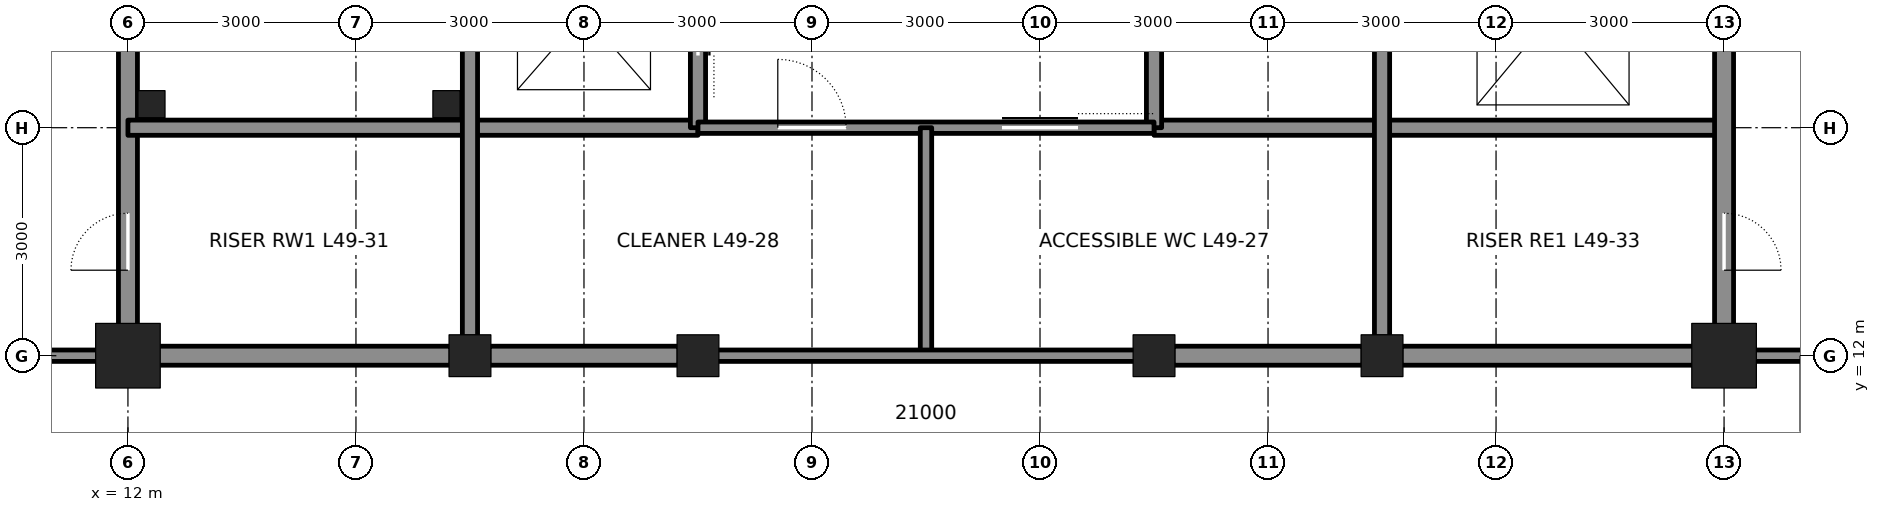
"""IFC4 building model, lengths in metres.
Left out: names, types, materials, properties, quantities, classifications, styles, units other than length and angle.
Written with IfcOpenShell. Run it as: python <this file> out.ifc"""

import sys

from ifc_helpers import new_model, si_unit, direction, frame, frame_2d, origin, origin_2d, place, context, subcontext, project, spatial, rectangle, hollow_rectangle, extrude, element, fill, save


model = new_model("IFC4")
c1 = context("Model", 3, precision=1e-05, world=origin(), true_north=direction((0.0, 1.0)))
c2 = subcontext(c1, "Body", "Model", "MODEL_VIEW")
j1 = project(units=[si_unit("LENGTHUNIT", "METRE"), si_unit("PLANEANGLEUNIT", "RADIAN")], contexts=[c1])
p1 = place(None, origin())
s1 = spatial("IfcSite", under=j1, at=p1, CompositionType="ELEMENT")
p2 = place(p1, origin())
s2 = spatial("IfcBuilding", under=s1, at=p2, CompositionType="ELEMENT")
p3 = place(p2, frame((0.0, 0.0, 222.3)))
s3 = spatial("IfcBuildingStorey", under=s2, at=p3, CompositionType="ELEMENT", Elevation=222.3)
p4 = place(p3, frame((12.0, 12.0, 0.0), z_axis=(0.0, 0.0, 1.0), x_axis=(1.0, 0.0, 0.0)))
e1 = element("IfcColumn", 1, at=p4, inside=s3, PredefinedType="COLUMN", context=c2, shape_type="SweptSolid", body=[
    extrude(hollow_rectangle(XDim=0.85, YDim=0.85, WallThickness=0.085, at=origin_2d()), origin(), (0.0, 0.0, 1.0), 4.2),
])
for number, where, z_axis, x_axis in (
    (2, (16.5, 12.0, 0.0), (0.0, 0.0, 1.0), (1.0, 0.0, 0.0)),
    (3, (19.5, 12.0, 0.0), (0.0, 0.0, 1.0), (1.0, 0.0, 0.0)),
    (4, (25.5, 12.0, 0.0), (0.0, 0.0, 1.0), (1.0, 0.0, 0.0)),
    (5, (28.5, 12.0, 0.0), (0.0, 0.0, 1.0), (1.0, 0.0, 0.0)),
):
    element("IfcColumn", number, at=place(p3, frame(where, z_axis=z_axis, x_axis=x_axis)), inside=s3, PredefinedType="COLUMN", context=c2, shape_type="SweptSolid", body=[
        extrude(hollow_rectangle(XDim=0.55, YDim=0.55, WallThickness=0.045, at=origin_2d()), origin(), (0.0, 0.0, 1.0), 4.2),
    ])
p5 = place(p3, frame((33.0, 12.0, 0.0), z_axis=(0.0, 0.0, 1.0), x_axis=(1.0, 0.0, 0.0)))
e6 = element("IfcColumn", 6, at=p5, inside=s3, PredefinedType="COLUMN", context=c2, shape_type="SweptSolid", body=[
    extrude(hollow_rectangle(XDim=0.85, YDim=0.85, WallThickness=0.085, at=origin_2d()), origin(), (0.0, 0.0, 1.0), 4.2),
])
p6 = place(p3, frame((12.0, 12.25, 0.0), z_axis=(0.0, 0.0, 1.0), x_axis=(0.0, 1.0, 0.0)))
e7 = element("IfcWall", 7, at=p6, inside=s3, PredefinedType="SOLIDWALL", context=c2, shape_type="SweptSolid", body=[
    extrude(rectangle(XDim=8.5, YDim=0.25, at=frame_2d((4.25, 0.0))), origin(), (0.0, 0.0, 1.0), 3.113),
])
p7 = place(p6, frame((0.875, 0.0, 0.0)))
e8 = element("IfcOpeningElement", 8, at=p7, cuts=e7, PredefinedType="OPENING", context=c2, shape_type="SweptSolid", body=[
    extrude(rectangle(XDim=0.75, YDim=2.1, at=frame_2d((0.375, 1.05))), frame((0.0, 0.135, 0.0), z_axis=(0.0, -1.0, 0.0), x_axis=(1.0, 0.0, 0.0)), (0.0, 0.0, 1.0), 0.27),
])
p8 = place(p3, frame((12.25, 12.0, 0.0), z_axis=(0.0, 0.0, 1.0), x_axis=(1.0, 0.0, 0.0)))
e9 = element("IfcWall", 9, at=p8, inside=s3, PredefinedType="SOLIDWALL", context=c2, shape_type="SweptSolid", body=[
    extrude(rectangle(XDim=4.0, YDim=0.25, at=frame_2d((2.0, 0.0))), origin(), (0.0, 0.0, 1.0), 3.181),
])
for number, where, z_axis, x_axis in (
    (10, (16.75, 12.0, 0.0), (0.0, 0.0, 1.0), (1.0, 0.0, 0.0)),
    (11, (25.75, 12.0, 0.0), (0.0, 0.0, 1.0), (1.0, 0.0, 0.0)),
):
    element("IfcWall", number, at=place(p3, frame(where, z_axis=z_axis, x_axis=x_axis)), inside=s3, PredefinedType="SOLIDWALL", context=c2, shape_type="SweptSolid", body=[
        extrude(rectangle(XDim=2.5, YDim=0.25, at=frame_2d((1.25, 0.0))), origin(), (0.0, 0.0, 1.0), 3.181),
    ])
p9 = place(p3, frame((28.75, 12.0, 0.0), z_axis=(0.0, 0.0, 1.0), x_axis=(1.0, 0.0, 0.0)))
e12 = element("IfcWall", 12, at=p9, inside=s3, PredefinedType="SOLIDWALL", context=c2, shape_type="SweptSolid", body=[
    extrude(rectangle(XDim=4.0, YDim=0.25, at=frame_2d((2.0, 0.0))), origin(), (0.0, 0.0, 1.0), 3.181),
])
for number, where, z_axis, x_axis in (
    (13, (12.0, 15.0, 0.0), (0.0, 0.0, 1.0), (1.0, 0.0, 0.0)),
    (14, (25.5, 15.0, 0.0), (0.0, 0.0, 1.0), (1.0, 0.0, 0.0)),
):
    element("IfcWall", number, at=place(p3, frame(where, z_axis=z_axis, x_axis=x_axis)), inside=s3, PredefinedType="SOLIDWALL", context=c2, shape_type="SweptSolid", body=[
        extrude(rectangle(XDim=7.5, YDim=0.2, at=frame_2d((3.75, 0.0))), origin(), (0.0, 0.0, 1.0), 4.04),
    ])
p10 = place(p3, frame((16.5, 12.25, 0.0), z_axis=(0.0, 0.0, 1.0), x_axis=(0.0, 1.0, 0.0)))
e15 = element("IfcWall", 15, at=p10, inside=s3, PredefinedType="SOLIDWALL", context=c2, shape_type="SweptSolid", body=[
    extrude(rectangle(XDim=8.5, YDim=0.2, at=frame_2d((4.25, 0.0))), origin(), (0.0, 0.0, 1.0), 3.113),
])
p11 = place(p3, frame((19.5, 15.0, 0.0), z_axis=(0.0, 0.0, 1.0), x_axis=(0.0, 1.0, 0.0)))
e16 = element("IfcWall", 16, at=p11, inside=s3, PredefinedType="SOLIDWALL", context=c2, shape_type="SweptSolid", body=[
    extrude(rectangle(XDim=12.0, YDim=0.2, at=frame_2d((6.0, 0.0))), origin(), (0.0, 0.0, 1.0), 3.064),
])
p12 = place(p11, frame((0.95, 0.0, 0.0)))
e17 = element("IfcOpeningElement", 17, at=p12, cuts=e16, PredefinedType="OPENING", context=c2, shape_type="SweptSolid", body=[
    extrude(rectangle(XDim=1.1, YDim=2.1, at=frame_2d((0.55, 1.05))), frame((0.0, 0.11, 0.0), z_axis=(0.0, -1.0, 0.0), x_axis=(1.0, 0.0, 0.0)), (0.0, 0.0, 1.0), 0.22),
])
p13 = place(p11, frame((3.95, 0.0, 0.0)))
e18 = element("IfcOpeningElement", 18, at=p13, cuts=e16, PredefinedType="OPENING", context=c2, shape_type="SweptSolid", body=[
    extrude(rectangle(XDim=1.1, YDim=2.1, at=frame_2d((0.55, 1.05))), frame((0.0, 0.11, 0.0), z_axis=(0.0, -1.0, 0.0), x_axis=(1.0, 0.0, 0.0)), (0.0, 0.0, 1.0), 0.22),
])
p14 = place(p11, frame((6.95, 0.0, 0.0)))
e19 = element("IfcOpeningElement", 19, at=p14, cuts=e16, PredefinedType="OPENING", context=c2, shape_type="SweptSolid", body=[
    extrude(rectangle(XDim=1.1, YDim=2.1, at=frame_2d((0.55, 1.05))), frame((0.0, 0.11, 0.0), z_axis=(0.0, -1.0, 0.0), x_axis=(1.0, 0.0, 0.0)), (0.0, 0.0, 1.0), 0.22),
])
p15 = place(p11, frame((9.95, 0.0, 0.0)))
e20 = element("IfcOpeningElement", 20, at=p15, cuts=e16, PredefinedType="OPENING", context=c2, shape_type="SweptSolid", body=[
    extrude(rectangle(XDim=1.1, YDim=2.1, at=frame_2d((0.55, 1.05))), frame((0.0, 0.11, 0.0), z_axis=(0.0, -1.0, 0.0), x_axis=(1.0, 0.0, 0.0)), (0.0, 0.0, 1.0), 0.22),
])
p16 = place(p3, frame((25.5, 15.0, 0.0), z_axis=(0.0, 0.0, 1.0), x_axis=(0.0, 1.0, 0.0)))
e21 = element("IfcWall", 21, at=p16, inside=s3, PredefinedType="SOLIDWALL", context=c2, shape_type="SweptSolid", body=[
    extrude(rectangle(XDim=12.0, YDim=0.2, at=frame_2d((6.0, 0.0))), origin(), (0.0, 0.0, 1.0), 3.064),
])
p17 = place(p3, frame((28.5, 12.25, 0.0), z_axis=(0.0, 0.0, 1.0), x_axis=(0.0, 1.0, 0.0)))
e22 = element("IfcWall", 22, at=p17, inside=s3, PredefinedType="SOLIDWALL", context=c2, shape_type="SweptSolid", body=[
    extrude(rectangle(XDim=8.5, YDim=0.2, at=frame_2d((4.25, 0.0))), origin(), (0.0, 0.0, 1.0), 3.113),
])
p18 = place(p3, frame((33.0, 12.25, 0.0), z_axis=(0.0, 0.0, 1.0), x_axis=(0.0, 1.0, 0.0)))
e23 = element("IfcWall", 23, at=p18, inside=s3, PredefinedType="SOLIDWALL", context=c2, shape_type="SweptSolid", body=[
    extrude(rectangle(XDim=8.5, YDim=0.25, at=frame_2d((4.25, 0.0))), origin(), (0.0, 0.0, 1.0), 3.113),
])
p19 = place(p18, frame((6.65, 0.0, 0.0)))
e24 = element("IfcOpeningElement", 24, at=p19, cuts=e23, PredefinedType="OPENING", context=c2, shape_type="SweptSolid", body=[
    extrude(rectangle(XDim=1.2, YDim=2.1, at=frame_2d((0.6, 1.05))), frame((0.0, 0.135, 0.0), z_axis=(0.0, -1.0, 0.0), x_axis=(1.0, 0.0, 0.0)), (0.0, 0.0, 1.0), 0.27),
])
p20 = place(p18, frame((0.875, 0.0, 0.0)))
e25 = element("IfcOpeningElement", 25, at=p20, cuts=e23, PredefinedType="OPENING", context=c2, shape_type="SweptSolid", body=[
    extrude(rectangle(XDim=0.75, YDim=2.1, at=frame_2d((0.375, 1.05))), frame((0.0, 0.135, 0.0), z_axis=(0.0, -1.0, 0.0), x_axis=(1.0, 0.0, 0.0)), (0.0, 0.0, 1.0), 0.27),
])
p21 = place(p3, frame((19.5, 15.0, 0.0), z_axis=(0.0, 0.0, 1.0), x_axis=(1.0, 0.0, 0.0)))
e26 = element("IfcWall", 26, at=p21, inside=s3, PredefinedType="PARTITIONING", context=c2, shape_type="SweptSolid", body=[
    extrude(rectangle(XDim=6.0, YDim=0.15, at=frame_2d((3.0, 0.0))), origin(), (0.0, 0.0, 1.0), 4.04),
])
p22 = place(p21, frame((4.0, 0.0, 0.0)))
e27 = element("IfcOpeningElement", 27, at=p22, cuts=e26, PredefinedType="OPENING", context=c2, shape_type="SweptSolid", body=[
    extrude(rectangle(XDim=1.0, YDim=2.1, at=frame_2d((0.5, 1.05))), frame((0.0, 0.085, 0.0), z_axis=(0.0, -1.0, 0.0), x_axis=(1.0, 0.0, 0.0)), (0.0, 0.0, 1.0), 0.17),
])
p23 = place(p21, frame((1.05, 0.0, 0.0)))
e28 = element("IfcOpeningElement", 28, at=p23, cuts=e26, PredefinedType="OPENING", context=c2, shape_type="SweptSolid", body=[
    extrude(rectangle(XDim=0.9, YDim=2.1, at=frame_2d((0.45, 1.05))), frame((0.0, 0.085, 0.0), z_axis=(0.0, -1.0, 0.0), x_axis=(1.0, 0.0, 0.0)), (0.0, 0.0, 1.0), 0.17),
])
p24 = place(p3, frame((22.5, 15.0, 0.0), z_axis=(0.0, 0.0, 1.0), x_axis=(0.0, -1.0, 0.0)))
e29 = element("IfcWall", 29, at=p24, inside=s3, PredefinedType="PARTITIONING", context=c2, shape_type="SweptSolid", body=[
    extrude(rectangle(XDim=3.0, YDim=0.15, at=frame_2d((1.5, 0.0))), origin(), (0.0, 0.0, 1.0), 4.04),
])
p25 = place(p3, frame((19.5, 12.0, 0.0), z_axis=(0.0, 0.0, 1.0), x_axis=(1.0, 0.0, 0.0)))
e30 = element("IfcWall", 30, at=p25, inside=s3, PredefinedType="PARTITIONING", context=c2, shape_type="SweptSolid", body=[
    extrude(rectangle(XDim=6.0, YDim=0.15, at=frame_2d((3.0, 0.0))), origin(), (0.0, 0.0, 1.0), 3.181),
])
p26 = place(p3, frame((10.2, 12.0, 0.0), z_axis=(0.0, 0.0, 1.0), x_axis=(1.0, 0.0, 0.0)))
e31 = element("IfcWall", 31, at=p26, inside=s3, PredefinedType="PARTITIONING", context=c2, shape_type="SweptSolid", body=[
    extrude(rectangle(XDim=1.8, YDim=0.15, at=frame_2d((0.9, 0.0))), origin(), (0.0, 0.0, 1.0), 3.27),
])
p27 = place(p3, frame((33.0, 12.0, 0.0), z_axis=(0.0, 0.0, 1.0), x_axis=(1.0, 0.0, 0.0)))
e32 = element("IfcWall", 32, at=p27, inside=s3, PredefinedType="PARTITIONING", context=c2, shape_type="SweptSolid", body=[
    extrude(rectangle(XDim=3.0, YDim=0.15, at=frame_2d((1.5, 0.0))), origin(), (0.0, 0.0, 1.0), 3.27),
])
p28 = place(p27, frame((1.0, 0.0, 0.0)))
e33 = element("IfcOpeningElement", 33, at=p28, cuts=e32, PredefinedType="OPENING", context=c2, shape_type="SweptSolid", body=[
    extrude(rectangle(XDim=1.0, YDim=2.4, at=frame_2d((0.5, 1.2))), frame((0.0, 0.085, 0.0), z_axis=(0.0, -1.0, 0.0), x_axis=(1.0, 0.0, 0.0)), (0.0, 0.0, 1.0), 0.17),
])
for number, where, z_axis, x_axis in (
    (34, (12.31, 15.31, 0.0), (0.0, 0.0, 1.0), (1.0, 0.0, 0.0)),
    (35, (16.19, 15.31, 0.0), (0.0, 0.0, 1.0), (1.0, 0.0, 0.0)),
):
    element("IfcColumn", number, at=place(p3, frame(where, z_axis=z_axis, x_axis=x_axis)), inside=s3, PredefinedType="COLUMN", context=c2, shape_type="SweptSolid", body=[
        extrude(hollow_rectangle(XDim=0.356, YDim=0.356, WallThickness=0.009, at=origin_2d()), origin(), (0.0, 0.0, 1.0), 4.2),
    ])
p29 = place(p7, origin())
e36 = element("IfcDoor", 36, at=p29, inside=s3, OperationType="SINGLE_SWING_LEFT", PredefinedType="DOOR", context=c2, shape_type="SweptSolid", body=[
    extrude(rectangle(XDim=0.75, YDim=2.1, at=frame_2d((0.375, 1.05))), frame((0.0, 0.025, 0.0), z_axis=(0.0, -1.0, 0.0), x_axis=(1.0, 0.0, 0.0)), (0.0, 0.0, 1.0), 0.05),
])
fill(e8, e36)
p30 = place(p20, frame((0.75, 0.0, 0.0), z_axis=(0.0, 0.0, 1.0), x_axis=(-1.0, 0.0, 0.0)))
e37 = element("IfcDoor", 37, at=p30, inside=s3, OperationType="SINGLE_SWING_RIGHT", PredefinedType="DOOR", context=c2, shape_type="SweptSolid", body=[
    extrude(rectangle(XDim=0.75, YDim=2.1, at=frame_2d((0.375, 1.05))), frame((0.0, 0.025, 0.0), z_axis=(0.0, -1.0, 0.0), x_axis=(1.0, 0.0, 0.0)), (0.0, 0.0, 1.0), 0.05),
])
fill(e25, e37)
p31 = place(p22, origin())
e38 = element("IfcDoor", 38, at=p31, inside=s3, OperationType="SLIDING_TO_LEFT", PredefinedType="DOOR", context=c2, shape_type="SweptSolid", body=[
    extrude(rectangle(XDim=1.0, YDim=2.1, at=frame_2d((0.5, 1.05))), frame((0.0, 0.025, 0.0), z_axis=(0.0, -1.0, 0.0), x_axis=(1.0, 0.0, 0.0)), (0.0, 0.0, 1.0), 0.05),
])
fill(e27, e38)
p32 = place(p23, origin())
e39 = element("IfcDoor", 39, at=p32, inside=s3, OperationType="SINGLE_SWING_LEFT", PredefinedType="DOOR", context=c2, shape_type="SweptSolid", body=[
    extrude(rectangle(XDim=0.9, YDim=2.1, at=frame_2d((0.45, 1.05))), frame((0.0, 0.025, 0.0), z_axis=(0.0, -1.0, 0.0), x_axis=(1.0, 0.0, 0.0)), (0.0, 0.0, 1.0), 0.05),
])
fill(e28, e39)
p33 = place(p12, origin())
e40 = element("IfcDoor", 40, at=p33, inside=s3, OperationType="DOUBLE_DOOR_SLIDING", PredefinedType="DOOR", context=c2, shape_type="SweptSolid", body=[
    extrude(rectangle(XDim=1.1, YDim=2.1, at=frame_2d((0.55, 1.05))), frame((0.0, 0.025, 0.0), z_axis=(0.0, -1.0, 0.0), x_axis=(1.0, 0.0, 0.0)), (0.0, 0.0, 1.0), 0.05),
])
fill(e17, e40)
save(model, sys.argv[1])
